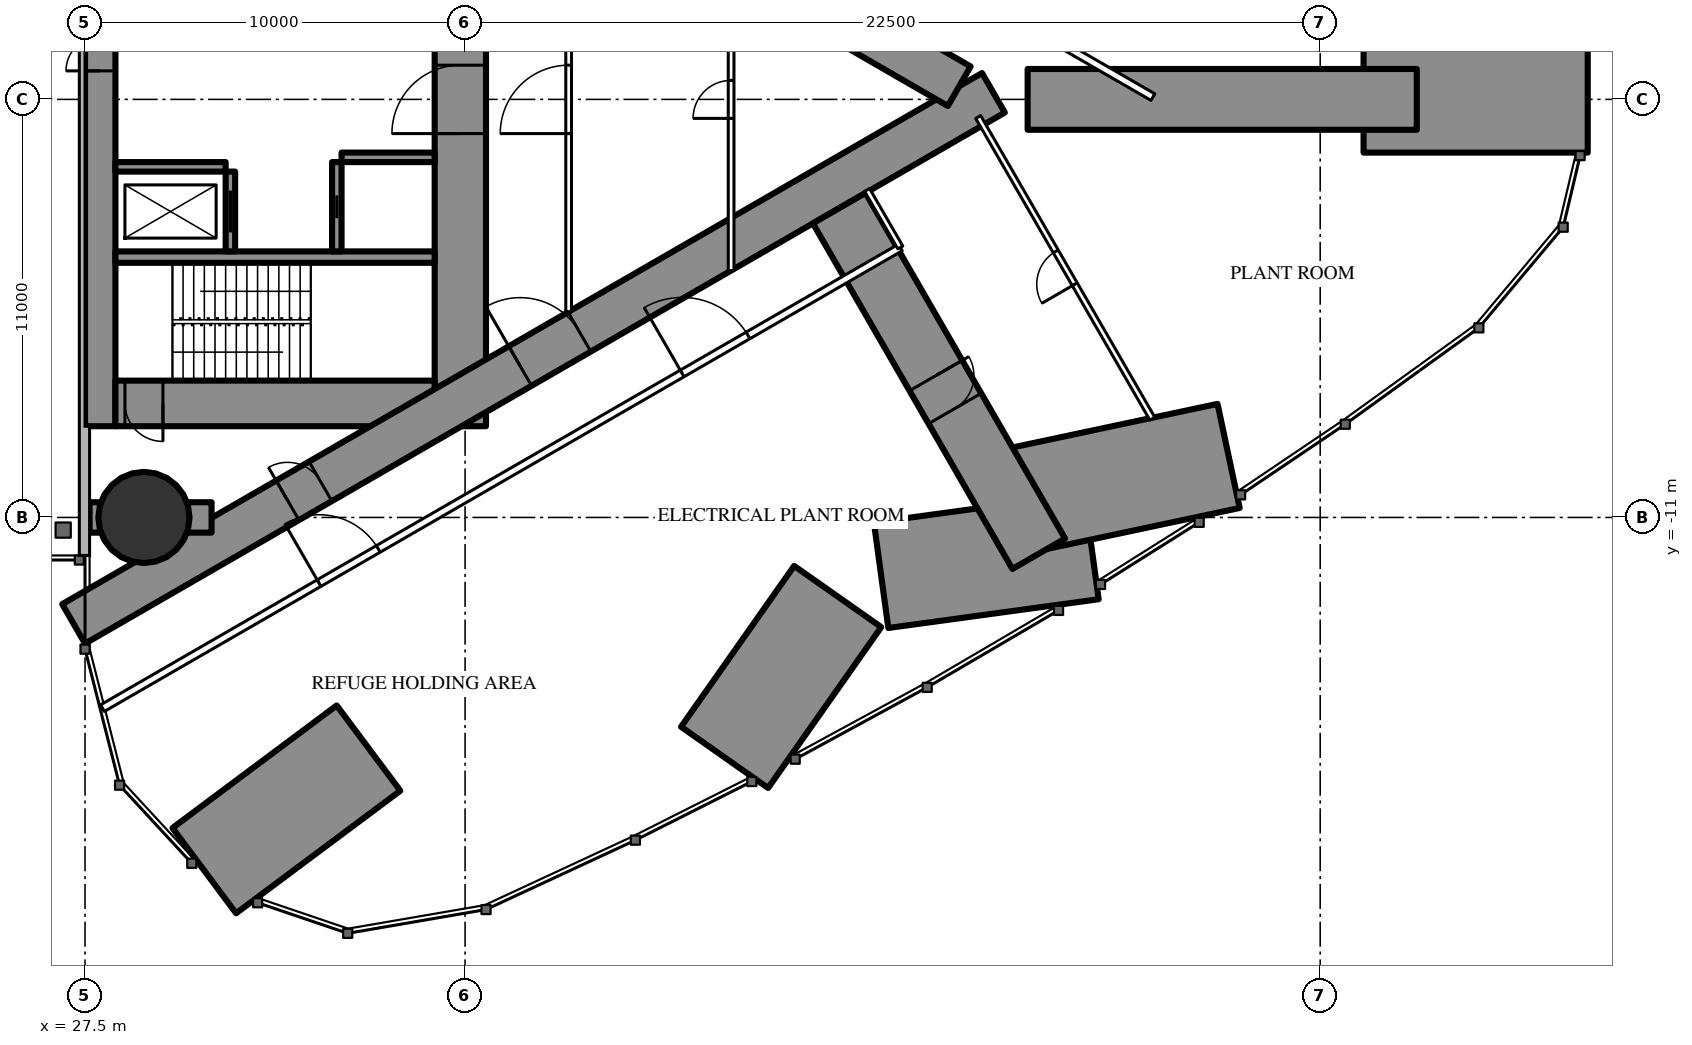
"""IFC4 building model, lengths in metres.
Left out: names, types, materials, properties, quantities, classifications, styles, units other than length and angle.
Written with IfcOpenShell. Run it as: python <this file> out.ifc"""

import sys

from ifc_helpers import new_model, si_unit, direction, frame, frame_2d, origin, origin_2d, place, context, subcontext, project, spatial, rectangle, hollow_circle, extrude, element, fill, save


model = new_model("IFC4")
c1 = context("Model", 3, precision=1e-05, world=origin(), true_north=direction((0.0, 1.0)))
c2 = subcontext(c1, "Body", "Model", "MODEL_VIEW")
j1 = project(units=[si_unit("LENGTHUNIT", "METRE"), si_unit("PLANEANGLEUNIT", "RADIAN")], contexts=[c1])
p1 = place(None, origin())
s1 = spatial("IfcSite", under=j1, at=p1, CompositionType="ELEMENT")
p2 = place(p1, origin())
s2 = spatial("IfcBuilding", under=s1, at=p2, CompositionType="ELEMENT")
p3 = place(p2, frame((0.0, 0.0, 205.3)))
s3 = spatial("IfcBuildingStorey", under=s2, at=p3, CompositionType="ELEMENT", Elevation=205.3)
p4 = place(p3, frame((67.04, 0.0, 0.0), z_axis=(0.0, 0.0, 1.0), x_axis=(-1.0, 0.0, 0.0)))
e1 = element("IfcWall", 1, at=p4, inside=s3, PredefinedType="SHEAR", context=c2, shape_type="SweptSolid", body=[
    extrude(rectangle(XDim=5.898, YDim=2.8, at=frame_2d((2.949, 0.0))), origin(), (0.0, 0.0, 1.0), 5.0),
])
p5 = place(p3, frame((30.637, -20.293, 0.0), z_axis=(0.0, 0.0, 1.0), x_axis=(0.80154582286, 0.597933352352, 0.0)))
e2 = element("IfcWall", 2, at=p5, inside=s3, PredefinedType="SHEAR", context=c2, shape_type="SweptSolid", body=[
    extrude(rectangle(XDim=5.392, YDim=2.8, at=frame_2d((2.696, 0.0))), origin(), (0.0, 0.0, 1.0), 5.0),
])
p6 = place(p3, frame((29.05, -11.0, 0.0), z_axis=(0.0, 0.0, 1.0), x_axis=(1.0, 0.0, 0.0)))
e3 = element("IfcColumn", 3, at=p6, inside=s3, PredefinedType="COLUMN", context=c2, shape_type="SweptSolid", body=[
    extrude(hollow_circle(Radius=1.2, WallThickness=0.09, at=origin_2d()), origin(), (0.0, 0.0, 1.0), 5.0),
])
p7 = place(p3, frame((44.328, -17.314, 0.0), z_axis=(0.0, 0.0, 1.0), x_axis=(0.575107689221, 0.818077713789, 0.0)))
e4 = element("IfcWall", 4, at=p7, inside=s3, PredefinedType="SHEAR", context=c2, shape_type="SweptSolid", body=[
    extrude(rectangle(XDim=5.175, YDim=2.8, at=frame_2d((2.587, 0.0))), origin(), (0.0, 0.0, 1.0), 5.0),
])
p8 = place(p3, frame((53.981, -11.765, 0.0), z_axis=(0.0, 0.0, 1.0), x_axis=(-0.99079635938, -0.135360903657, 0.0)))
e5 = element("IfcWall", 5, at=p8, inside=s3, PredefinedType="SHEAR", context=c2, shape_type="SweptSolid", body=[
    extrude(rectangle(XDim=5.586, YDim=2.8, at=frame_2d((2.793, 0.0))), origin(), (0.0, 0.0, 1.0), 5.0),
])
p9 = place(p3, frame((57.59, -9.381, 0.0), z_axis=(0.0, 0.0, 1.0), x_axis=(-0.978147441256, -0.207912441101, 0.0)))
e6 = element("IfcWall", 6, at=p9, inside=s3, PredefinedType="SHEAR", context=c2, shape_type="SweptSolid", body=[
    extrude(rectangle(XDim=5.983, YDim=2.8, at=frame_2d((2.991, 0.0))), origin(), (0.0, 0.0, 1.0), 5.0),
])
p10 = place(p3, frame((27.9, -8.6, 0.0), z_axis=(0.0, 0.0, 1.0), x_axis=(0.0, 1.0, 0.0)))
e7 = element("IfcWall", 7, at=p10, inside=s3, PredefinedType="SHEAR", context=c2, shape_type="SweptSolid", body=[
    extrude(rectangle(XDim=17.2, YDim=0.8, at=frame_2d((8.6, 0.0))), origin(), (0.0, 0.0, 1.0), 5.0),
])
p11 = place(p10, frame((9.35, 0.0, 0.0)))
e8 = element("IfcOpeningElement", 8, at=p11, cuts=e7, PredefinedType="OPENING", context=c2, shape_type="SweptSolid", body=[
    extrude(rectangle(XDim=0.9, YDim=2.2, at=frame_2d((0.45, 1.1))), frame((0.0, 0.41, 0.0), z_axis=(0.0, -1.0, 0.0), x_axis=(1.0, 0.0, 0.0)), (0.0, 0.0, 1.0), 0.82),
])
p12 = place(p3, frame((37.375, -8.6, 0.0), z_axis=(0.0, 0.0, 1.0), x_axis=(0.0, 1.0, 0.0)))
e9 = element("IfcWall", 9, at=p12, inside=s3, PredefinedType="SHEAR", context=c2, shape_type="SweptSolid", body=[
    extrude(rectangle(XDim=17.2, YDim=1.35, at=frame_2d((8.6, 0.0))), origin(), (0.0, 0.0, 1.0), 5.0),
])
p13 = place(p12, frame((7.7, 0.0, 0.0)))
e10 = element("IfcOpeningElement", 10, at=p13, cuts=e9, PredefinedType="OPENING", context=c2, shape_type="SweptSolid", body=[
    extrude(rectangle(XDim=1.8, YDim=2.2, at=frame_2d((0.9, 1.1))), frame((0.0, 0.685, 0.0), z_axis=(0.0, -1.0, 0.0), x_axis=(1.0, 0.0, 0.0)), (0.0, 0.0, 1.0), 1.37),
])
p14 = place(p3, frame((28.3, -8.0, 0.0), z_axis=(0.0, 0.0, 1.0), x_axis=(1.0, 0.0, 0.0)))
e11 = element("IfcWall", 11, at=p14, inside=s3, PredefinedType="SHEAR", context=c2, shape_type="SweptSolid", body=[
    extrude(rectangle(XDim=8.4, YDim=1.2, at=frame_2d((4.2, 0.0))), origin(), (0.0, 0.0, 1.0), 5.0),
])
p15 = place(p14, frame((0.25, 0.0, 0.0)))
e12 = element("IfcOpeningElement", 12, at=p15, cuts=e11, PredefinedType="OPENING", context=c2, shape_type="SweptSolid", body=[
    extrude(rectangle(XDim=1.0, YDim=2.2, at=frame_2d((0.5, 1.1))), frame((0.0, 0.61, 0.0), z_axis=(0.0, -1.0, 0.0), x_axis=(1.0, 0.0, 0.0)), (0.0, 0.0, 1.0), 1.22),
])
p16 = place(p3, frame((28.3, -4.15, 0.0), z_axis=(0.0, 0.0, 1.0), x_axis=(1.0, 0.0, 0.0)))
e13 = element("IfcWall", 13, at=p16, inside=s3, PredefinedType="SHEAR", context=c2, shape_type="SweptSolid", body=[
    extrude(rectangle(XDim=8.4, YDim=0.3, at=frame_2d((4.2, 0.0))), origin(), (0.0, 0.0, 1.0), 5.0),
])
p17 = place(p3, frame((31.325, -4.0, 0.0), z_axis=(0.0, 0.0, 1.0), x_axis=(0.0, 1.0, 0.0)))
e14 = element("IfcWall", 14, at=p17, inside=s3, PredefinedType="SHEAR", context=c2, shape_type="SweptSolid", body=[
    extrude(rectangle(XDim=2.1, YDim=0.25, at=frame_2d((1.05, 0.0))), origin(), (0.0, 0.0, 1.0), 5.0),
])
p18 = place(p17, frame((0.5, 0.0, 0.0)))
e15 = element("IfcOpeningElement", 15, at=p18, cuts=e14, PredefinedType="OPENING", context=c2, shape_type="SweptSolid", body=[
    extrude(rectangle(XDim=1.1, YDim=2.2, at=frame_2d((0.55, 1.1))), frame((0.0, 0.135, 0.0), z_axis=(0.0, -1.0, 0.0), x_axis=(1.0, 0.0, 0.0)), (0.0, 0.0, 1.0), 0.27),
])
p19 = place(p3, frame((34.125, -4.0, 0.0), z_axis=(0.0, 0.0, 1.0), x_axis=(0.0, 1.0, 0.0)))
e16 = element("IfcWall", 16, at=p19, inside=s3, PredefinedType="SHEAR", context=c2, shape_type="SweptSolid", body=[
    extrude(rectangle(XDim=2.35, YDim=0.25, at=frame_2d((1.175, 0.0))), origin(), (0.0, 0.0, 1.0), 5.0),
])
p20 = place(p19, frame((0.875, 0.0, 0.0)))
e17 = element("IfcOpeningElement", 17, at=p20, cuts=e16, PredefinedType="OPENING", context=c2, shape_type="SweptSolid", body=[
    extrude(rectangle(XDim=0.6, YDim=2.0, at=frame_2d((0.3, 1.0))), frame((0.0, 0.135, 0.0), z_axis=(0.0, -1.0, 0.0), x_axis=(1.0, 0.0, 0.0)), (0.0, 0.0, 1.0), 0.27),
])
p21 = place(p3, frame((28.3, -1.775, 0.0), z_axis=(0.0, 0.0, 1.0), x_axis=(1.0, 0.0, 0.0)))
e18 = element("IfcWall", 18, at=p21, inside=s3, PredefinedType="SHEAR", context=c2, shape_type="SweptSolid", body=[
    extrude(rectangle(XDim=2.9, YDim=0.25, at=frame_2d((1.45, 0.0))), origin(), (0.0, 0.0, 1.0), 5.0),
])
p22 = place(p3, frame((34.25, -1.525, 0.0), z_axis=(0.0, 0.0, 1.0), x_axis=(1.0, 0.0, 0.0)))
e19 = element("IfcWall", 19, at=p22, inside=s3, PredefinedType="SHEAR", context=c2, shape_type="SweptSolid", body=[
    extrude(rectangle(XDim=2.45, YDim=0.25, at=frame_2d((1.225, 0.0))), origin(), (0.0, 0.0, 1.0), 5.0),
])
p23 = place(p3, frame((27.2, -13.8, 0.0), z_axis=(0.0, 0.0, 1.0), x_axis=(0.866027159892, 0.499996958321, 0.0)))
e20 = element("IfcWall", 20, at=p23, inside=s3, PredefinedType="SHEAR", context=c2, shape_type="SweptSolid", body=[
    extrude(rectangle(XDim=27.947, YDim=1.2, at=frame_2d((13.973, 0.0))), origin(), (0.0, 0.0, 1.0), 5.0),
])
p24 = place(p23, frame((6.5, 0.0, 0.0)))
e21 = element("IfcOpeningElement", 21, at=p24, cuts=e20, PredefinedType="OPENING", context=c2, shape_type="SweptSolid", body=[
    extrude(rectangle(XDim=1.0, YDim=2.2, at=frame_2d((0.5, 1.1))), frame((0.0, 0.61, 0.0), z_axis=(0.0, -1.0, 0.0), x_axis=(1.0, 0.0, 0.0)), (0.0, 0.0, 1.0), 1.22),
])
p25 = place(p23, frame((13.568, 0.0, 0.0)))
e22 = element("IfcOpeningElement", 22, at=p25, cuts=e20, PredefinedType="OPENING", context=c2, shape_type="SweptSolid", body=[
    extrude(rectangle(XDim=1.8, YDim=2.2, at=frame_2d((0.9, 1.1))), frame((0.0, 0.61, 0.0), z_axis=(0.0, -1.0, 0.0), x_axis=(1.0, 0.0, 0.0)), (0.0, 0.0, 1.0), 1.22),
])
p26 = place(p3, frame((27.2, 13.8, 0.0), z_axis=(0.0, 0.0, 1.0), x_axis=(0.866024515034, -0.500001539357, 0.0)))
e23 = element("IfcWall", 23, at=p26, inside=s3, PredefinedType="SHEAR", context=c2, shape_type="SweptSolid", body=[
    extrude(rectangle(XDim=26.907, YDim=1.2, at=frame_2d((13.454, 0.0))), origin(), (0.0, 0.0, 1.0), 5.0),
])
p27 = place(p26, frame((6.5, 0.0, 0.0)))
e24 = element("IfcOpeningElement", 24, at=p27, cuts=e23, PredefinedType="OPENING", context=c2, shape_type="SweptSolid", body=[
    extrude(rectangle(XDim=1.0, YDim=2.2, at=frame_2d((0.5, 1.1))), frame((0.0, 0.61, 0.0), z_axis=(0.0, -1.0, 0.0), x_axis=(1.0, 0.0, 0.0)), (0.0, 0.0, 1.0), 1.22),
])
p28 = place(p26, frame((13.568, 0.0, 0.0)))
e25 = element("IfcOpeningElement", 25, at=p28, cuts=e23, PredefinedType="OPENING", context=c2, shape_type="SweptSolid", body=[
    extrude(rectangle(XDim=1.8, YDim=2.2, at=frame_2d((0.9, 1.1))), frame((0.0, 0.61, 0.0), z_axis=(0.0, -1.0, 0.0), x_axis=(1.0, 0.0, 0.0)), (0.0, 0.0, 1.0), 1.22),
])
p29 = place(p3, frame((27.62, -11.0, 0.0), z_axis=(0.0, 0.0, 1.0), x_axis=(1.0, 0.0, 0.0)))
e26 = element("IfcWall", 26, at=p29, inside=s3, PredefinedType="SHEAR", context=c2, shape_type="SweptSolid", body=[
    extrude(rectangle(XDim=3.209, YDim=0.8, at=frame_2d((1.605, 0.0))), origin(), (0.0, 0.0, 1.0), 5.0),
])
p30 = place(p3, frame((47.345, -2.862, 0.0), z_axis=(0.0, 0.0, 1.0), x_axis=(0.500012973899, -0.866017913171, 0.0)))
e27 = element("IfcWall", 27, at=p30, inside=s3, PredefinedType="SHEAR", context=c2, shape_type="SweptSolid", body=[
    extrude(rectangle(XDim=10.499, YDim=1.6, at=frame_2d((5.25, 0.0))), origin(), (0.0, 0.0, 1.0), 5.0),
])
p31 = place(p30, frame((5.087, 0.0, 0.0)))
e28 = element("IfcOpeningElement", 28, at=p31, cuts=e27, PredefinedType="OPENING", context=c2, shape_type="SweptSolid", body=[
    extrude(rectangle(XDim=1.0, YDim=2.2, at=frame_2d((0.5, 1.1))), frame((0.0, 0.81, 0.0), z_axis=(0.0, -1.0, 0.0), x_axis=(1.0, 0.0, 0.0)), (0.0, 0.0, 1.0), 1.62),
])
p32 = place(p3, frame((52.302, 0.0, 0.0), z_axis=(0.0, 0.0, 1.0), x_axis=(1.0, 0.0, 0.0)))
e29 = element("IfcWall", 29, at=p32, inside=s3, PredefinedType="SHEAR", context=c2, shape_type="SweptSolid", body=[
    extrude(rectangle(XDim=10.239, YDim=1.6, at=frame_2d((5.12, 0.0))), origin(), (0.0, 0.0, 1.0), 5.0),
])
p33 = place(p3, frame((55.583, -8.401, 0.0), z_axis=(0.0, 0.0, 1.0), x_axis=(-0.499997575924, 0.866026803321, 0.0)))
e30 = element("IfcWall", 30, at=p33, inside=s3, PredefinedType="PARTITIONING", context=c2, shape_type="SweptSolid", body=[
    extrude(rectangle(XDim=9.167, YDim=0.15, at=frame_2d((4.583, 0.0))), origin(), (0.0, 0.0, 1.0), 4.75),
])
p34 = place(p33, frame((4.083, 0.0, 0.0)))
e31 = element("IfcOpeningElement", 31, at=p34, cuts=e30, PredefinedType="OPENING", context=c2, shape_type="SweptSolid", body=[
    extrude(rectangle(XDim=1.0, YDim=2.2, at=frame_2d((0.5, 1.1))), frame((0.0, 0.085, 0.0), z_axis=(0.0, -1.0, 0.0), x_axis=(1.0, 0.0, 0.0)), (0.0, 0.0, 1.0), 0.17),
])
p35 = place(p3, frame((52.639, 1.769, 0.0), z_axis=(0.0, 0.0, 1.0), x_axis=(0.866027340901, -0.4999966448, 0.0)))
e32 = element("IfcWall", 32, at=p35, inside=s3, PredefinedType="PARTITIONING", context=c2, shape_type="SweptSolid", body=[
    extrude(rectangle(XDim=3.417, YDim=0.2, at=frame_2d((1.708, 0.0))), origin(), (0.0, 0.0, 1.0), 4.75),
])
p36 = place(p3, frame((27.959, -16.017, 0.0), z_axis=(0.0, 0.0, 1.0), x_axis=(0.866026253963, 0.499998527445, 0.0)))
e33 = element("IfcWall", 33, at=p36, inside=s3, PredefinedType="PARTITIONING", context=c2, shape_type="SweptSolid", body=[
    extrude(rectangle(XDim=24.241, YDim=0.2, at=frame_2d((12.12, 0.0))), origin(), (0.0, 0.0, 1.0), 4.75),
])
p37 = place(p36, frame((6.579, 0.0, 0.0)))
e34 = element("IfcOpeningElement", 34, at=p37, cuts=e33, PredefinedType="OPENING", context=c2, shape_type="SweptSolid", body=[
    extrude(rectangle(XDim=1.8, YDim=2.2, at=frame_2d((0.9, 1.1))), frame((0.0, 0.11, 0.0), z_axis=(0.0, -1.0, 0.0), x_axis=(1.0, 0.0, 0.0)), (0.0, 0.0, 1.0), 0.22),
])
p38 = place(p36, frame((17.612, 0.0, 0.0)))
e35 = element("IfcOpeningElement", 35, at=p38, cuts=e33, PredefinedType="OPENING", context=c2, shape_type="SweptSolid", body=[
    extrude(rectangle(XDim=2.0, YDim=2.4, at=frame_2d((1.0, 1.2))), frame((0.0, 0.11, 0.0), z_axis=(0.0, -1.0, 0.0), x_axis=(1.0, 0.0, 0.0)), (0.0, 0.0, 1.0), 0.22),
])
p39 = place(p3, frame((48.953, -3.897, 0.0), z_axis=(0.0, 0.0, 1.0), x_axis=(-0.499980071345, 0.866036909293, 0.0)))
e36 = element("IfcWall", 36, at=p39, inside=s3, PredefinedType="PARTITIONING", context=c2, shape_type="SweptSolid", body=[
    extrude(rectangle(XDim=1.75, YDim=0.15, at=frame_2d((0.875, 0.0))), origin(), (0.0, 0.0, 1.0), 4.75),
])
p40 = place(p3, frame((40.225, -5.587, 0.0), z_axis=(0.0, 0.0, 1.0), x_axis=(0.0, 1.0, 0.0)))
e37 = element("IfcWall", 37, at=p40, inside=s3, PredefinedType="PARTITIONING", context=c2, shape_type="SweptSolid", body=[
    extrude(rectangle(XDim=11.174, YDim=0.15, at=frame_2d((5.587, 0.0))), origin(), (0.0, 0.0, 1.0), 4.75),
])
p41 = place(p40, frame((4.687, 0.0, 0.0)))
e38 = element("IfcOpeningElement", 38, at=p41, cuts=e37, PredefinedType="OPENING", context=c2, shape_type="SweptSolid", body=[
    extrude(rectangle(XDim=1.8, YDim=2.2, at=frame_2d((0.9, 1.1))), frame((0.0, 0.085, 0.0), z_axis=(0.0, -1.0, 0.0), x_axis=(1.0, 0.0, 0.0)), (0.0, 0.0, 1.0), 0.17),
])
p42 = place(p3, frame((44.5, -4.505, 0.0), z_axis=(0.0, 0.0, 1.0), x_axis=(0.0, 1.0, 0.0)))
e39 = element("IfcWall", 39, at=p42, inside=s3, PredefinedType="PARTITIONING", context=c2, shape_type="SweptSolid", body=[
    extrude(rectangle(XDim=9.009, YDim=0.15, at=frame_2d((4.505, 0.0))), origin(), (0.0, 0.0, 1.0), 4.75),
])
p43 = place(p42, frame((4.005, 0.0, 0.0)))
e40 = element("IfcOpeningElement", 40, at=p43, cuts=e39, PredefinedType="OPENING", context=c2, shape_type="SweptSolid", body=[
    extrude(rectangle(XDim=1.0, YDim=2.2, at=frame_2d((0.5, 1.1))), frame((0.0, 0.085, 0.0), z_axis=(0.0, -1.0, 0.0), x_axis=(1.0, 0.0, 0.0)), (0.0, 0.0, 1.0), 0.17),
])
p44 = place(p37, origin())
e41 = element("IfcDoor", 41, at=p44, inside=s3, OperationType="DOUBLE_DOOR_SINGLE_SWING", PredefinedType="DOOR", context=c2, shape_type="SweptSolid", body=[
    extrude(rectangle(XDim=1.8, YDim=2.2, at=frame_2d((0.9, 1.1))), frame((0.0, 0.025, 0.0), z_axis=(0.0, -1.0, 0.0), x_axis=(1.0, 0.0, 0.0)), (0.0, 0.0, 1.0), 0.05),
])
fill(e34, e41)
p45 = place(p38, origin())
e42 = element("IfcDoor", 42, at=p45, inside=s3, OperationType="DOUBLE_DOOR_SINGLE_SWING", PredefinedType="DOOR", context=c2, shape_type="SweptSolid", body=[
    extrude(rectangle(XDim=2.0, YDim=2.4, at=frame_2d((1.0, 1.2))), frame((0.0, 0.025, 0.0), z_axis=(0.0, -1.0, 0.0), x_axis=(1.0, 0.0, 0.0)), (0.0, 0.0, 1.0), 0.05),
])
fill(e35, e42)
p46 = place(p31, origin())
e43 = element("IfcDoor", 43, at=p46, inside=s3, OperationType="SINGLE_SWING_LEFT", PredefinedType="DOOR", context=c2, shape_type="SweptSolid", body=[
    extrude(rectangle(XDim=1.0, YDim=2.2, at=frame_2d((0.5, 1.1))), frame((0.0, 0.025, 0.0), z_axis=(0.0, -1.0, 0.0), x_axis=(1.0, 0.0, 0.0)), (0.0, 0.0, 1.0), 0.05),
])
fill(e28, e43)
p47 = place(p34, origin())
e44 = element("IfcDoor", 44, at=p47, inside=s3, OperationType="SINGLE_SWING_LEFT", PredefinedType="DOOR", context=c2, shape_type="SweptSolid", body=[
    extrude(rectangle(XDim=1.0, YDim=2.2, at=frame_2d((0.5, 1.1))), frame((0.0, 0.025, 0.0), z_axis=(0.0, -1.0, 0.0), x_axis=(1.0, 0.0, 0.0)), (0.0, 0.0, 1.0), 0.05),
])
fill(e31, e44)
p48 = place(p41, origin())
e45 = element("IfcDoor", 45, at=p48, inside=s3, OperationType="DOUBLE_DOOR_SINGLE_SWING", PredefinedType="DOOR", context=c2, shape_type="SweptSolid", body=[
    extrude(rectangle(XDim=1.8, YDim=2.2, at=frame_2d((0.9, 1.1))), frame((0.0, 0.025, 0.0), z_axis=(0.0, -1.0, 0.0), x_axis=(1.0, 0.0, 0.0)), (0.0, 0.0, 1.0), 0.05),
])
fill(e38, e45)
p49 = place(p43, origin())
e46 = element("IfcDoor", 46, at=p49, inside=s3, OperationType="SINGLE_SWING_LEFT", PredefinedType="DOOR", context=c2, shape_type="SweptSolid", body=[
    extrude(rectangle(XDim=1.0, YDim=2.2, at=frame_2d((0.5, 1.1))), frame((0.0, 0.025, 0.0), z_axis=(0.0, -1.0, 0.0), x_axis=(1.0, 0.0, 0.0)), (0.0, 0.0, 1.0), 0.05),
])
fill(e40, e46)
p50 = place(p24, origin())
e47 = element("IfcDoor", 47, at=p50, inside=s3, OperationType="SINGLE_SWING_LEFT", PredefinedType="DOOR", context=c2, shape_type="SweptSolid", body=[
    extrude(rectangle(XDim=1.0, YDim=2.2, at=frame_2d((0.5, 1.1))), frame((0.0, 0.025, 0.0), z_axis=(0.0, -1.0, 0.0), x_axis=(1.0, 0.0, 0.0)), (0.0, 0.0, 1.0), 0.05),
])
fill(e21, e47)
p51 = place(p25, origin())
e48 = element("IfcDoor", 48, at=p51, inside=s3, OperationType="DOUBLE_DOOR_SINGLE_SWING", PredefinedType="DOOR", context=c2, shape_type="SweptSolid", body=[
    extrude(rectangle(XDim=1.8, YDim=2.2, at=frame_2d((0.9, 1.1))), frame((0.0, 0.025, 0.0), z_axis=(0.0, -1.0, 0.0), x_axis=(1.0, 0.0, 0.0)), (0.0, 0.0, 1.0), 0.05),
])
fill(e22, e48)
p52 = place(p13, origin())
e49 = element("IfcDoor", 49, at=p52, inside=s3, OperationType="DOUBLE_DOOR_SINGLE_SWING", PredefinedType="DOOR", context=c2, shape_type="SweptSolid", body=[
    extrude(rectangle(XDim=1.8, YDim=2.2, at=frame_2d((0.9, 1.1))), frame((0.0, 0.025, 0.0), z_axis=(0.0, -1.0, 0.0), x_axis=(1.0, 0.0, 0.0)), (0.0, 0.0, 1.0), 0.05),
])
fill(e10, e49)
p53 = place(p15, origin())
e50 = element("IfcDoor", 50, at=p53, inside=s3, OperationType="SINGLE_SWING_RIGHT", PredefinedType="DOOR", context=c2, shape_type="SweptSolid", body=[
    extrude(rectangle(XDim=1.0, YDim=2.2, at=frame_2d((0.5, 1.1))), frame((0.0, 0.025, 0.0), z_axis=(0.0, -1.0, 0.0), x_axis=(1.0, 0.0, 0.0)), (0.0, 0.0, 1.0), 0.05),
])
fill(e12, e50)
p54 = place(p11, origin())
e51 = element("IfcDoor", 51, at=p54, inside=s3, OperationType="SINGLE_SWING_LEFT", PredefinedType="DOOR", context=c2, shape_type="SweptSolid", body=[
    extrude(rectangle(XDim=0.9, YDim=2.2, at=frame_2d((0.45, 1.1))), frame((0.0, 0.025, 0.0), z_axis=(0.0, -1.0, 0.0), x_axis=(1.0, 0.0, 0.0)), (0.0, 0.0, 1.0), 0.05),
])
fill(e8, e51)
p55 = place(p18, origin())
e52 = element("IfcDoor", 52, at=p55, inside=s3, OperationType="SLIDING_TO_LEFT", PredefinedType="USERDEFINED", context=c2, shape_type="SweptSolid", body=[
    extrude(rectangle(XDim=1.1, YDim=2.2, at=frame_2d((0.55, 1.1))), frame((0.0, 0.025, 0.0), z_axis=(0.0, -1.0, 0.0), x_axis=(1.0, 0.0, 0.0)), (0.0, 0.0, 1.0), 0.05),
])
fill(e15, e52)
p56 = place(p20, origin())
e53 = element("IfcDoor", 53, at=p56, inside=s3, OperationType="SLIDING_TO_LEFT", PredefinedType="DOOR", context=c2, shape_type="SweptSolid", body=[
    extrude(rectangle(XDim=0.6, YDim=2.0, at=frame_2d((0.3, 1.0))), frame((0.0, 0.025, 0.0), z_axis=(0.0, -1.0, 0.0), x_axis=(1.0, 0.0, 0.0)), (0.0, 0.0, 1.0), 0.05),
])
fill(e17, e53)
save(model, sys.argv[1])
